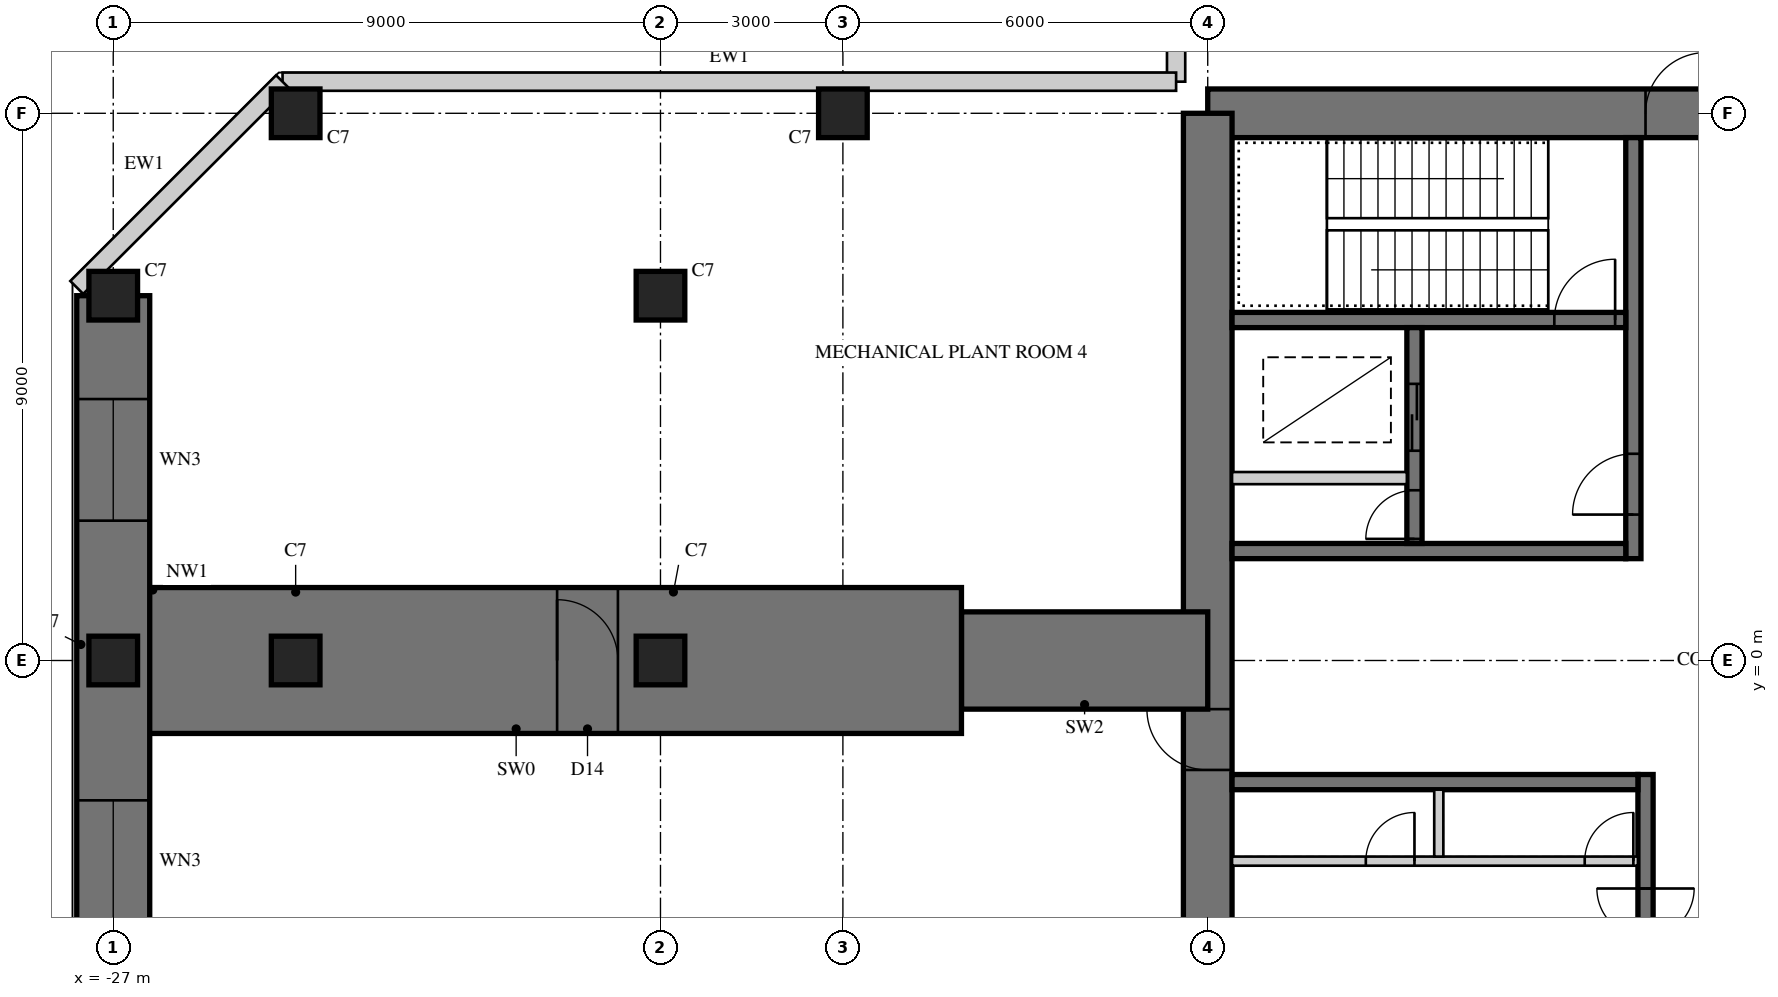
"""IFC4 building model, lengths in metres.
Left out: names, types, materials, properties, quantities, classifications, styles, units other than length and angle.
Written with IfcOpenShell. Run it as: python <this file> out.ifc"""

import sys

from ifc_helpers import new_model, si_unit, direction, frame, frame_2d, origin, origin_2d, place, context, subcontext, project, spatial, rectangle, hollow_rectangle, extrude, element, fill, save


model = new_model("IFC4")
c1 = context("Model", 3, precision=1e-05, world=origin(), true_north=direction((0.0, 1.0)))
c2 = subcontext(c1, "Body", "Model", "MODEL_VIEW")
j1 = project(units=[si_unit("LENGTHUNIT", "METRE"), si_unit("PLANEANGLEUNIT", "RADIAN")], contexts=[c1])
p1 = place(None, origin())
s1 = spatial("IfcSite", under=j1, at=p1, CompositionType="ELEMENT")
p2 = place(p1, origin())
s2 = spatial("IfcBuilding", under=s1, at=p2, CompositionType="ELEMENT")
p3 = place(p2, frame((0.0, 0.0, 252.7)))
s3 = spatial("IfcBuildingStorey", under=s2, at=p3, CompositionType="ELEMENT", Elevation=252.7)
p4 = place(p3, frame((9.0, 9.0, 0.0), z_axis=(0.0, 0.0, 1.0), x_axis=(-1.0, 0.0, 0.0)))
e1 = element("IfcWall", 1, at=p4, inside=s3, PredefinedType="SHEAR", context=c2, shape_type="SweptSolid", body=[
    extrude(rectangle(XDim=18.0, YDim=0.8, at=frame_2d((9.0, 0.0))), origin(), (0.0, 0.0, 1.0), 5.0),
])
p5 = place(p4, frame((9.8, 0.0, 0.0)))
e2 = element("IfcOpeningElement", 2, at=p5, cuts=e1, PredefinedType="OPENING", context=c2, shape_type="SweptSolid", body=[
    extrude(rectangle(XDim=1.0, YDim=2.4, at=frame_2d((0.5, 1.2))), frame((0.0, 0.41, 0.0), z_axis=(0.0, -1.0, 0.0), x_axis=(1.0, 0.0, 0.0)), (0.0, 0.0, 1.0), 0.82),
])
p6 = place(p3, frame((-9.0, 9.0, 0.0), z_axis=(0.0, 0.0, 1.0), x_axis=(0.0, -1.0, 0.0)))
e3 = element("IfcWall", 3, at=p6, inside=s3, PredefinedType="SHEAR", context=c2, shape_type="SweptSolid", body=[
    extrude(rectangle(XDim=18.0, YDim=0.8, at=frame_2d((9.0, 0.0))), origin(), (0.0, 0.0, 1.0), 5.0),
])
p7 = place(p6, frame((9.8, 0.0, 0.0)))
e4 = element("IfcOpeningElement", 4, at=p7, cuts=e3, PredefinedType="OPENING", context=c2, shape_type="SweptSolid", body=[
    extrude(rectangle(XDim=1.0, YDim=2.4, at=frame_2d((0.5, 1.2))), frame((0.0, 0.41, 0.0), z_axis=(0.0, -1.0, 0.0), x_axis=(1.0, 0.0, 0.0)), (0.0, 0.0, 1.0), 0.82),
])
p8 = place(p3, frame((-2.0, 1.675, 0.0), z_axis=(0.0, 0.0, 1.0), x_axis=(0.0, 1.0, 0.0)))
e5 = element("IfcWall", 5, at=p8, inside=s3, PredefinedType="SHEAR", context=c2, shape_type="SweptSolid", body=[
    extrude(rectangle(XDim=6.925, YDim=0.25, at=frame_2d((3.462, 0.0))), origin(), (0.0, 0.0, 1.0), 5.0),
])
p9 = place(p8, frame((0.725, 0.0, 0.0)))
e6 = element("IfcOpeningElement", 6, at=p9, cuts=e5, PredefinedType="OPENING", context=c2, shape_type="SweptSolid", body=[
    extrude(rectangle(XDim=1.0, YDim=2.1, at=frame_2d((0.5, 1.05))), frame((0.0, 0.135, 0.0), z_axis=(0.0, -1.0, 0.0), x_axis=(1.0, 0.0, 0.0)), (0.0, 0.0, 1.0), 0.27),
])
p10 = place(p3, frame((-2.125, 1.8, 0.0), z_axis=(0.0, 0.0, 1.0), x_axis=(-1.0, 0.0, 0.0)))
e7 = element("IfcWall", 7, at=p10, inside=s3, PredefinedType="SHEAR", context=c2, shape_type="SweptSolid", body=[
    extrude(rectangle(XDim=6.475, YDim=0.25, at=frame_2d((3.238, 0.0))), origin(), (0.0, 0.0, 1.0), 5.0),
])
p11 = place(p3, frame((-2.125, 5.6, 0.0), z_axis=(0.0, 0.0, 1.0), x_axis=(-1.0, 0.0, 0.0)))
e8 = element("IfcWall", 8, at=p11, inside=s3, PredefinedType="SHEAR", context=c2, shape_type="SweptSolid", body=[
    extrude(rectangle(XDim=6.475, YDim=0.25, at=frame_2d((3.238, 0.0))), origin(), (0.0, 0.0, 1.0), 5.0),
])
p12 = place(p11, frame((0.175, 0.0, 0.0)))
e9 = element("IfcOpeningElement", 9, at=p12, cuts=e8, PredefinedType="OPENING", context=c2, shape_type="SweptSolid", body=[
    extrude(rectangle(XDim=1.0, YDim=2.1, at=frame_2d((0.5, 1.05))), frame((0.0, 0.135, 0.0), z_axis=(0.0, -1.0, 0.0), x_axis=(1.0, 0.0, 0.0)), (0.0, 0.0, 1.0), 0.27),
])
p13 = place(p3, frame((-5.6, 1.925, 0.0), z_axis=(0.0, 0.0, 1.0), x_axis=(0.0, 1.0, 0.0)))
e10 = element("IfcWall", 10, at=p13, inside=s3, PredefinedType="SHEAR", context=c2, shape_type="SweptSolid", body=[
    extrude(rectangle(XDim=3.55, YDim=0.25, at=frame_2d((1.775, 0.0))), origin(), (0.0, 0.0, 1.0), 5.0),
])
p14 = place(p13, frame((1.525, 0.0, 0.0)))
e11 = element("IfcOpeningElement", 11, at=p14, cuts=e10, PredefinedType="OPENING", context=c2, shape_type="SweptSolid", body=[
    extrude(rectangle(XDim=1.1, YDim=2.2, at=frame_2d((0.55, 1.1))), frame((0.0, 0.135, 0.0), z_axis=(0.0, -1.0, 0.0), x_axis=(1.0, 0.0, 0.0)), (0.0, 0.0, 1.0), 0.27),
])
p15 = place(p13, frame((0.075, 0.0, 0.0)))
e12 = element("IfcOpeningElement", 12, at=p15, cuts=e10, PredefinedType="OPENING", context=c2, shape_type="SweptSolid", body=[
    extrude(rectangle(XDim=0.8, YDim=2.1, at=frame_2d((0.4, 1.05))), frame((0.0, 0.135, 0.0), z_axis=(0.0, -1.0, 0.0), x_axis=(1.0, 0.0, 0.0)), (0.0, 0.0, 1.0), 0.27),
])
p16 = place(p3, frame((-5.725, 3.0, 0.0), z_axis=(0.0, 0.0, 1.0), x_axis=(-1.0, 0.0, 0.0)))
e13 = element("IfcWall", 13, at=p16, inside=s3, PredefinedType="PARTITIONING", context=c2, shape_type="SweptSolid", body=[
    extrude(rectangle(XDim=2.875, YDim=0.2, at=frame_2d((1.438, 0.0))), origin(), (0.0, 0.0, 1.0), 5.0),
])
p17 = place(p3, frame((-1.8, -1.875, 0.0), z_axis=(0.0, 0.0, 1.0), x_axis=(0.0, -1.0, 0.0)))
e14 = element("IfcWall", 14, at=p17, inside=s3, PredefinedType="SHEAR", context=c2, shape_type="SweptSolid", body=[
    extrude(rectangle(XDim=6.725, YDim=0.25, at=frame_2d((3.363, 0.0))), origin(), (0.0, 0.0, 1.0), 5.0),
])
p18 = place(p17, frame((1.875, 0.0, 0.0)))
e15 = element("IfcOpeningElement", 15, at=p18, cuts=e14, PredefinedType="OPENING", context=c2, shape_type="SweptSolid", body=[
    extrude(rectangle(XDim=1.6, YDim=2.4, at=frame_2d((0.8, 1.2))), frame((0.0, 0.135, 0.0), z_axis=(0.0, -1.0, 0.0), x_axis=(1.0, 0.0, 0.0)), (0.0, 0.0, 1.0), 0.27),
])
p19 = place(p3, frame((-1.925, -2.0, 0.0), z_axis=(0.0, 0.0, 1.0), x_axis=(-1.0, 0.0, 0.0)))
e16 = element("IfcWall", 16, at=p19, inside=s3, PredefinedType="SHEAR", context=c2, shape_type="SweptSolid", body=[
    extrude(rectangle(XDim=6.675, YDim=0.25, at=frame_2d((3.337, 0.0))), origin(), (0.0, 0.0, 1.0), 5.0),
])
p20 = place(p3, frame((-1.925, -3.3, 0.0), z_axis=(0.0, 0.0, 1.0), x_axis=(-1.0, 0.0, 0.0)))
e17 = element("IfcWall", 17, at=p20, inside=s3, PredefinedType="PARTITIONING", context=c2, shape_type="SweptSolid", body=[
    extrude(rectangle(XDim=6.675, YDim=0.15, at=frame_2d((3.337, 0.0))), origin(), (0.0, 0.0, 1.0), 5.0),
])
p21 = place(p20, frame((0.075, 0.0, 0.0)))
e18 = element("IfcOpeningElement", 18, at=p21, cuts=e17, PredefinedType="OPENING", context=c2, shape_type="SweptSolid", body=[
    extrude(rectangle(XDim=0.8, YDim=2.1, at=frame_2d((0.4, 1.05))), frame((0.0, 0.085, 0.0), z_axis=(0.0, -1.0, 0.0), x_axis=(1.0, 0.0, 0.0)), (0.0, 0.0, 1.0), 0.17),
])
p22 = place(p20, frame((3.675, 0.0, 0.0)))
e19 = element("IfcOpeningElement", 19, at=p22, cuts=e17, PredefinedType="OPENING", context=c2, shape_type="SweptSolid", body=[
    extrude(rectangle(XDim=0.8, YDim=2.1, at=frame_2d((0.4, 1.05))), frame((0.0, 0.085, 0.0), z_axis=(0.0, -1.0, 0.0), x_axis=(1.0, 0.0, 0.0)), (0.0, 0.0, 1.0), 0.17),
])
p23 = place(p3, frame((-5.2, -2.125, 0.0), z_axis=(0.0, 0.0, 1.0), x_axis=(0.0, -1.0, 0.0)))
e20 = element("IfcWall", 20, at=p23, inside=s3, PredefinedType="PARTITIONING", context=c2, shape_type="SweptSolid", body=[
    extrude(rectangle(XDim=1.1, YDim=0.15, at=frame_2d((0.55, 0.0))), origin(), (0.0, 0.0, 1.0), 5.0),
])
p24 = place(p3, frame((-9.0, 0.0, 0.0), z_axis=(0.0, 0.0, 1.0), x_axis=(-1.0, 0.0, 0.0)))
e21 = element("IfcWall", 21, at=p24, inside=s3, PredefinedType="SHEAR", context=c2, shape_type="SweptSolid", body=[
    extrude(rectangle(XDim=4.05, YDim=1.6, at=frame_2d((2.025, 0.0))), origin(), (0.0, 0.0, 1.0), 5.0),
])
p25 = place(p3, frame((-13.05, 0.0, 0.0), z_axis=(0.0, 0.0, 1.0), x_axis=(-1.0, 0.0, 0.0)))
e22 = element("IfcWall", 22, at=p25, inside=s3, PredefinedType="SHEAR", context=c2, shape_type="SweptSolid", body=[
    extrude(rectangle(XDim=13.95, YDim=2.4, at=frame_2d((6.975, 0.0))), origin(), (0.0, 0.0, 1.0), 5.0),
])
p26 = place(p25, frame((5.65, 0.0, 0.0)))
e23 = element("IfcOpeningElement", 23, at=p26, cuts=e22, PredefinedType="OPENING", context=c2, shape_type="SweptSolid", body=[
    extrude(rectangle(XDim=1.0, YDim=2.2, at=frame_2d((0.5, 1.1))), frame((0.0, 1.21, 0.0), z_axis=(0.0, -1.0, 0.0), x_axis=(1.0, 0.0, 0.0)), (0.0, 0.0, 1.0), 2.42),
])
p27 = place(p3, frame((-27.0, 6.0, 0.0), z_axis=(0.0, 0.0, 1.0), x_axis=(0.0, -1.0, 0.0)))
e24 = element("IfcWall", 24, at=p27, inside=s3, PredefinedType="SHEAR", context=c2, shape_type="SweptSolid", body=[
    extrude(rectangle(XDim=12.0, YDim=1.2, at=frame_2d((6.0, 0.0))), origin(), (0.0, 0.0, 1.0), 5.0),
])
p28 = place(p27, frame((1.7, 0.0, 0.8)))
e25 = element("IfcOpeningElement", 25, at=p28, cuts=e24, PredefinedType="OPENING", context=c2, shape_type="SweptSolid", body=[
    extrude(rectangle(XDim=2.0, YDim=2.5, at=frame_2d((1.0, 1.25))), frame((0.0, 0.61, 0.0), z_axis=(0.0, -1.0, 0.0), x_axis=(1.0, 0.0, 0.0)), (0.0, 0.0, 1.0), 1.22),
])
p29 = place(p27, frame((8.3, 0.0, 0.8)))
e26 = element("IfcOpeningElement", 26, at=p29, cuts=e24, PredefinedType="OPENING", context=c2, shape_type="SweptSolid", body=[
    extrude(rectangle(XDim=2.0, YDim=2.5, at=frame_2d((1.0, 1.25))), frame((0.0, 0.61, 0.0), z_axis=(0.0, -1.0, 0.0), x_axis=(1.0, 0.0, 0.0)), (0.0, 0.0, 1.0), 1.22),
])
for number, where, z_axis, x_axis in (
    (27, (-15.0, 9.0, 0.0), (0.0, 0.0, 1.0), (1.0, 0.0, 0.0)),
    (28, (-24.0, 9.0, 0.0), (0.0, 0.0, 1.0), (1.0, 0.0, 0.0)),
    (29, (-27.0, 6.0, 0.0), (0.0, 0.0, 1.0), (1.0, 0.0, 0.0)),
    (30, (-27.0, 0.0, 0.0), (0.0, 0.0, 1.0), (1.0, 0.0, 0.0)),
    (31, (-18.0, 6.0, 0.0), (0.0, 0.0, 1.0), (1.0, 0.0, 0.0)),
    (32, (-18.0, 0.0, 0.0), (0.0, 0.0, 1.0), (1.0, 0.0, 0.0)),
    (33, (-24.0, 0.0, 0.0), (0.0, 0.0, 1.0), (1.0, 0.0, 0.0)),
):
    element("IfcColumn", number, at=place(p3, frame(where, z_axis=z_axis, x_axis=x_axis)), inside=s3, PredefinedType="COLUMN", context=c2, shape_type="SweptSolid", body=[
        extrude(rectangle(XDim=0.8, YDim=0.8, at=origin_2d()), origin(), (0.0, 0.0, 1.0), 5.0),
    ])
p30 = place(p3, frame((-9.52, 15.215, 0.0), z_axis=(0.0, 0.0, 1.0), x_axis=(0.0, -1.0, 0.0)))
e34 = element("IfcWall", 34, at=p30, inside=s3, PredefinedType="SOLIDWALL", context=c2, shape_type="SweptSolid", body=[
    extrude(rectangle(XDim=5.695, YDim=0.3, at=frame_2d((2.848, 0.0))), origin(), (0.0, 0.0, 1.0), 4.82),
])
p31 = place(p3, frame((-9.52, 9.52, 0.0), z_axis=(0.0, 0.0, 1.0), x_axis=(-1.0, 0.0, 0.0)))
e35 = element("IfcWall", 35, at=p31, inside=s3, PredefinedType="SOLIDWALL", context=c2, shape_type="SweptSolid", body=[
    extrude(rectangle(XDim=14.695, YDim=0.3, at=frame_2d((7.348, 0.0))), origin(), (0.0, 0.0, 1.0), 4.82),
])
p32 = place(p3, frame((-24.215, 9.52, 0.0), z_axis=(0.0, 0.0, 1.0), x_axis=(-0.707132283189, -0.707081278264, 0.0)))
e36 = element("IfcWall", 36, at=p32, inside=s3, PredefinedType="SOLIDWALL", context=c2, shape_type="SweptSolid", body=[
    extrude(rectangle(XDim=4.787, YDim=0.3, at=frame_2d((2.393, 0.0))), origin(), (0.0, 0.0, 1.0), 4.82),
])
p33 = place(p28, origin())
e37 = element("IfcWindow", 37, at=p33, inside=s3, PartitioningType="SINGLE_PANEL", PredefinedType="WINDOW", context=c2, shape_type="SweptSolid", body=[
    extrude(hollow_rectangle(XDim=2.0, YDim=2.5, WallThickness=0.06, at=frame_2d((1.0, 1.25))), frame((0.0, 0.03, 0.0), z_axis=(0.0, -1.0, 0.0), x_axis=(1.0, 0.0, 0.0)), (0.0, 0.0, 1.0), 0.06),
    extrude(rectangle(XDim=1.879, YDim=2.379, at=frame_2d((1.0, 1.25))), frame((0.0, 0.03, 0.0), z_axis=(0.0, -1.0, 0.0), x_axis=(1.0, 0.0, 0.0)), (0.0, 0.0, 1.0), 0.06),
])
fill(e25, e37)
p34 = place(p29, origin())
e38 = element("IfcWindow", 38, at=p34, inside=s3, PartitioningType="SINGLE_PANEL", PredefinedType="WINDOW", context=c2, shape_type="SweptSolid", body=[
    extrude(hollow_rectangle(XDim=2.0, YDim=2.5, WallThickness=0.06, at=frame_2d((1.0, 1.25))), frame((0.0, 0.03, 0.0), z_axis=(0.0, -1.0, 0.0), x_axis=(1.0, 0.0, 0.0)), (0.0, 0.0, 1.0), 0.06),
    extrude(rectangle(XDim=1.879, YDim=2.379, at=frame_2d((1.0, 1.25))), frame((0.0, 0.03, 0.0), z_axis=(0.0, -1.0, 0.0), x_axis=(1.0, 0.0, 0.0)), (0.0, 0.0, 1.0), 0.06),
])
fill(e26, e38)
p35 = place(p26, frame((1.0, 0.0, 0.0), z_axis=(0.0, 0.0, 1.0), x_axis=(-1.0, 0.0, 0.0)))
e39 = element("IfcDoor", 39, at=p35, inside=s3, OperationType="SINGLE_SWING_LEFT", PredefinedType="DOOR", context=c2, shape_type="SweptSolid", body=[
    extrude(rectangle(XDim=1.0, YDim=2.2, at=frame_2d((0.5, 1.1))), frame((0.0, 0.025, 0.0), z_axis=(0.0, -1.0, 0.0), x_axis=(1.0, 0.0, 0.0)), (0.0, 0.0, 1.0), 0.05),
])
fill(e23, e39)
p36 = place(p5, frame((1.0, 0.0, 0.0), z_axis=(0.0, 0.0, 1.0), x_axis=(-1.0, 0.0, 0.0)))
e40 = element("IfcDoor", 40, at=p36, inside=s3, OperationType="SINGLE_SWING_RIGHT", PredefinedType="DOOR", context=c2, shape_type="SweptSolid", body=[
    extrude(rectangle(XDim=1.0, YDim=2.4, at=frame_2d((0.5, 1.2))), frame((0.0, -0.005, 0.0), z_axis=(0.0, -1.0, 0.0), x_axis=(1.0, 0.0, 0.0)), (0.0, 0.0, 1.0), 0.05),
])
fill(e2, e40)
p37 = place(p7, frame((1.0, 0.0, 0.0), z_axis=(0.0, 0.0, 1.0), x_axis=(-1.0, 0.0, 0.0)))
e41 = element("IfcDoor", 41, at=p37, inside=s3, OperationType="SINGLE_SWING_RIGHT", PredefinedType="DOOR", context=c2, shape_type="SweptSolid", body=[
    extrude(rectangle(XDim=1.0, YDim=2.4, at=frame_2d((0.5, 1.2))), frame((0.0, -0.005, 0.0), z_axis=(0.0, -1.0, 0.0), x_axis=(1.0, 0.0, 0.0)), (0.0, 0.0, 1.0), 0.05),
])
fill(e4, e41)
p38 = place(p9, origin())
e42 = element("IfcDoor", 42, at=p38, inside=s3, OperationType="SINGLE_SWING_LEFT", PredefinedType="DOOR", context=c2, shape_type="SweptSolid", body=[
    extrude(rectangle(XDim=1.0, YDim=2.1, at=frame_2d((0.5, 1.05))), frame((0.0, 0.025, 0.0), z_axis=(0.0, -1.0, 0.0), x_axis=(1.0, 0.0, 0.0)), (0.0, 0.0, 1.0), 0.05),
])
fill(e6, e42)
p39 = place(p12, frame((1.0, 0.0, 0.0), z_axis=(0.0, 0.0, 1.0), x_axis=(-1.0, 0.0, 0.0)))
e43 = element("IfcDoor", 43, at=p39, inside=s3, OperationType="SINGLE_SWING_RIGHT", PredefinedType="DOOR", context=c2, shape_type="SweptSolid", body=[
    extrude(rectangle(XDim=1.0, YDim=2.1, at=frame_2d((0.5, 1.05))), frame((0.0, 0.025, 0.0), z_axis=(0.0, -1.0, 0.0), x_axis=(1.0, 0.0, 0.0)), (0.0, 0.0, 1.0), 0.05),
])
fill(e9, e43)
p40 = place(p14, origin())
e44 = element("IfcDoor", 44, at=p40, inside=s3, OperationType="DOUBLE_DOOR_SLIDING", PredefinedType="DOOR", context=c2, shape_type="SweptSolid", body=[
    extrude(rectangle(XDim=1.1, YDim=2.2, at=frame_2d((0.55, 1.1))), frame((0.0, 0.025, 0.0), z_axis=(0.0, -1.0, 0.0), x_axis=(1.0, 0.0, 0.0)), (0.0, 0.0, 1.0), 0.05),
])
fill(e11, e44)
p41 = place(p15, origin())
e45 = element("IfcDoor", 45, at=p41, inside=s3, OperationType="SINGLE_SWING_LEFT", PredefinedType="DOOR", context=c2, shape_type="SweptSolid", body=[
    extrude(rectangle(XDim=0.8, YDim=2.1, at=frame_2d((0.4, 1.05))), frame((0.0, 0.025, 0.0), z_axis=(0.0, -1.0, 0.0), x_axis=(1.0, 0.0, 0.0)), (0.0, 0.0, 1.0), 0.05),
])
fill(e12, e45)
p42 = place(p18, origin())
e46 = element("IfcDoor", 46, at=p42, inside=s3, OperationType="DOUBLE_DOOR_DOUBLE_SWING", PredefinedType="DOOR", context=c2, shape_type="SweptSolid", body=[
    extrude(rectangle(XDim=1.6, YDim=2.4, at=frame_2d((0.8, 1.2))), frame((0.0, 0.025, 0.0), z_axis=(0.0, -1.0, 0.0), x_axis=(1.0, 0.0, 0.0)), (0.0, 0.0, 1.0), 0.05),
])
fill(e15, e46)
p43 = place(p21, frame((0.8, 0.0, 0.0), z_axis=(0.0, 0.0, 1.0), x_axis=(-1.0, 0.0, 0.0)))
e47 = element("IfcDoor", 47, at=p43, inside=s3, OperationType="SINGLE_SWING_RIGHT", PredefinedType="DOOR", context=c2, shape_type="SweptSolid", body=[
    extrude(rectangle(XDim=0.8, YDim=2.1, at=frame_2d((0.4, 1.05))), frame((0.0, 0.025, 0.0), z_axis=(0.0, -1.0, 0.0), x_axis=(1.0, 0.0, 0.0)), (0.0, 0.0, 1.0), 0.05),
])
fill(e18, e47)
p44 = place(p22, frame((0.8, 0.0, 0.0), z_axis=(0.0, 0.0, 1.0), x_axis=(-1.0, 0.0, 0.0)))
e48 = element("IfcDoor", 48, at=p44, inside=s3, OperationType="SINGLE_SWING_RIGHT", PredefinedType="DOOR", context=c2, shape_type="SweptSolid", body=[
    extrude(rectangle(XDim=0.8, YDim=2.1, at=frame_2d((0.4, 1.05))), frame((0.0, 0.025, 0.0), z_axis=(0.0, -1.0, 0.0), x_axis=(1.0, 0.0, 0.0)), (0.0, 0.0, 1.0), 0.05),
])
fill(e19, e48)
save(model, sys.argv[1])
